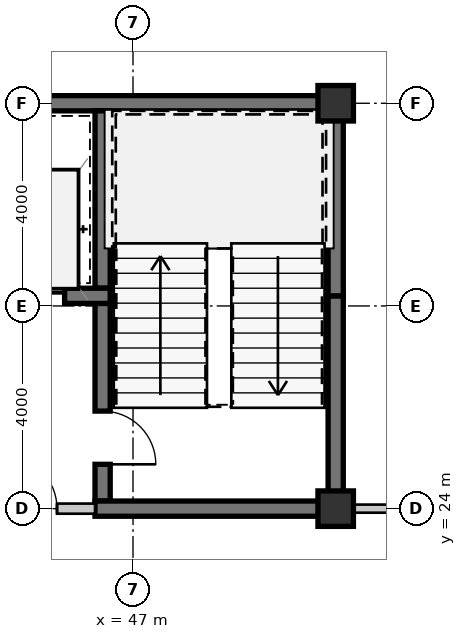
"""IFC4 building model, lengths in metres.
Left out: names, types, materials, properties, quantities, classifications, styles, units other than length and angle.
Written with IfcOpenShell. Run it as: python <this file> out.ifc"""

import sys

from ifc_helpers import new_model, si_unit, direction, frame, frame_2d, origin, origin_2d, place, context, subcontext, project, spatial, rectangle, extrude, source, transform, mapped, element, fill, save


model = new_model("IFC4")
c1 = context("Model", 3, precision=1e-05, world=origin(), true_north=direction((0.0, 1.0)))
c2 = subcontext(c1, "Body", "Model", "MODEL_VIEW")
j1 = project(units=[si_unit("LENGTHUNIT", "METRE"), si_unit("PLANEANGLEUNIT", "RADIAN")], contexts=[c1])
p1 = place(None, origin())
s1 = spatial("IfcSite", under=j1, at=p1, CompositionType="ELEMENT")
p2 = place(p1, origin())
s2 = spatial("IfcBuilding", under=s1, at=p2, CompositionType="ELEMENT")
p3 = place(p2, frame((0.0, 0.0, 106.05)))
s3 = spatial("IfcBuildingStorey", under=s2, at=p3, CompositionType="ELEMENT", Elevation=106.05)
m1 = source(origin(), c2, "Body", "SweptSolid", [
    extrude(rectangle(XDim=0.7, YDim=0.7, at=origin_2d()), origin(), (0.0, 0.0, 1.0), 3.15),
])
for number, where, z_axis, x_axis in (
    (1, (51.0, 24.0, 0.0), (0.0, 0.0, 1.0), (1.0, 0.0, 0.0)),
    (2, (51.0, 32.0, 0.0), (0.0, 0.0, 1.0), (1.0, 0.0, 0.0)),
):
    element("IfcColumn", number, at=place(p3, frame(where, z_axis=z_axis, x_axis=x_axis)), inside=s3, PredefinedType="COLUMN", context=c2, shape_type="MappedRepresentation", body=[
        mapped(m1, transform((0.0, 0.0, 0.0), scale=1.0)),
    ])
m2 = source(origin(), c2, "Body", "SweptSolid", [
    extrude(rectangle(XDim=11.95, YDim=0.3, at=frame_2d((5.975, 0.0))), origin(), (0.0, 0.0, 1.0), 2.93),
])
p4 = place(p3, frame((39.2, 32.0, 0.0), z_axis=(0.0, 0.0, 1.0), x_axis=(1.0, 0.0, 0.0)))
e3 = element("IfcWall", 3, at=p4, inside=s3, PredefinedType="SHEAR", context=c2, shape_type="MappedRepresentation", body=[
    mapped(m2, transform((0.0, 0.0, 0.0), scale=1.0)),
])
m3 = source(origin(), c2, "Body", "SweptSolid", [
    extrude(rectangle(XDim=4.05, YDim=0.3, at=frame_2d((2.025, 0.0))), origin(), (0.0, 0.0, 1.0), 2.93),
])
p5 = place(p3, frame((51.0, 24.15, 0.0), z_axis=(0.0, 0.0, 1.0), x_axis=(0.0, 1.0, 0.0)))
e4 = element("IfcWall", 4, at=p5, inside=s3, PredefinedType="SHEAR", context=c2, shape_type="MappedRepresentation", body=[
    mapped(m3, transform((0.0, 0.0, 0.0), scale=1.0)),
])
m4 = source(origin(), c2, "Body", "SweptSolid", [
    extrude(rectangle(XDim=3.65, YDim=0.3, at=frame_2d((1.825, 0.0))), origin(), (0.0, 0.0, 1.0), 2.93),
])
p6 = place(p3, frame((51.0, 28.2, 0.0), z_axis=(0.0, 0.0, 1.0), x_axis=(0.0, 1.0, 0.0)))
e5 = element("IfcWall", 5, at=p6, inside=s3, PredefinedType="SHEAR", context=c2, shape_type="MappedRepresentation", body=[
    mapped(m4, transform((0.0, 0.0, 0.0), scale=1.0)),
])
m5 = source(origin(), c2, "Body", "SweptSolid", [
    extrude(rectangle(XDim=3.5, YDim=0.3, at=frame_2d((1.75, 0.0))), origin(), (0.0, 0.0, 1.0), 2.93),
])
p7 = place(p3, frame((46.4, 31.85, 0.0), z_axis=(0.0, 0.0, 1.0), x_axis=(0.0, -1.0, 0.0)))
e6 = element("IfcWall", 6, at=p7, inside=s3, PredefinedType="SHEAR", context=c2, shape_type="MappedRepresentation", body=[
    mapped(m5, transform((0.0, 0.0, 0.0), scale=1.0)),
])
m6 = source(origin(), c2, "Body", "SweptSolid", [
    extrude(rectangle(XDim=3.9, YDim=0.3, at=frame_2d((1.95, 0.0))), origin(), (0.0, 0.0, 1.0), 2.93),
])
p8 = place(p3, frame((46.4, 28.05, 0.0), z_axis=(0.0, 0.0, 1.0), x_axis=(0.0, -1.0, 0.0)))
e7 = element("IfcWall", 7, at=p8, inside=s3, PredefinedType="SHEAR", context=c2, shape_type="MappedRepresentation", body=[
    mapped(m6, transform((0.0, 0.0, 0.0), scale=1.0)),
])
m7 = source(origin(), c2, "Body", "SweptSolid", [
    extrude(rectangle(XDim=1.05, YDim=2.1, at=frame_2d((0.525, 1.05))), frame((0.0, 0.16, 0.0), z_axis=(0.0, -1.0, 0.0), x_axis=(1.0, 0.0, 0.0)), (0.0, 0.0, 1.0), 0.32),
])
p9 = place(p8, frame((2.125, 0.0, 0.0)))
e8 = element("IfcOpeningElement", 8, at=p9, cuts=e7, PredefinedType="OPENING", context=c2, shape_type="MappedRepresentation", body=[
    mapped(m7, transform((0.0, 0.0, 0.0), scale=1.0)),
])
m8 = source(origin(), c2, "Body", "SweptSolid", [
    extrude(rectangle(XDim=4.9, YDim=0.3, at=frame_2d((2.45, 0.0))), origin(), (0.0, 0.0, 1.0), 2.93),
])
p10 = place(p3, frame((46.25, 24.0, 0.0), z_axis=(0.0, 0.0, 1.0), x_axis=(1.0, 0.0, 0.0)))
e9 = element("IfcWall", 9, at=p10, inside=s3, PredefinedType="SHEAR", context=c2, shape_type="MappedRepresentation", body=[
    mapped(m8, transform((0.0, 0.0, 0.0), scale=1.0)),
])
m9 = source(origin(), c2, "Body", "SweptSolid", [
    extrude(rectangle(XDim=2.9, YDim=0.3, at=frame_2d((1.45, 0.0))), origin(), (0.0, 0.0, 1.0), 2.93),
])
p11 = place(p3, frame((43.65, 28.2, 0.0), z_axis=(0.0, 0.0, 1.0), x_axis=(1.0, 0.0, 0.0)))
e10 = element("IfcWall", 10, at=p11, inside=s3, PredefinedType="SHEAR", context=c2, shape_type="MappedRepresentation", body=[
    mapped(m9, transform((0.0, 0.0, 0.0), scale=1.0)),
])
m10 = source(origin(), c2, "Body", "SweptSolid", [
    extrude(rectangle(XDim=1.1, YDim=2.15, at=frame_2d((0.55, 1.075))), frame((0.0, 0.16, 0.0), z_axis=(0.0, -1.0, 0.0), x_axis=(1.0, 0.0, 0.0)), (0.0, 0.0, 1.0), 0.32),
])
p12 = place(p11, frame((0.9, 0.0, 0.0)))
e11 = element("IfcOpeningElement", 11, at=p12, cuts=e10, PredefinedType="OPENING", context=c2, shape_type="MappedRepresentation", body=[
    mapped(m10, transform((0.0, 0.0, 0.0), scale=1.0)),
])
m11 = source(origin(), c2, "Body", "SweptSolid", [
    extrude(rectangle(XDim=2.7, YDim=0.2, at=frame_2d((1.35, 0.0))), origin(), (0.0, 0.0, 1.0), 2.397),
])
p13 = place(p3, frame((43.55, 24.0, 0.0), z_axis=(0.0, 0.0, 1.0), x_axis=(1.0, 0.0, 0.0)))
e12 = element("IfcWall", 12, at=p13, inside=s3, PredefinedType="SOLIDWALL", context=c2, shape_type="MappedRepresentation", body=[
    mapped(m11, transform((0.0, 0.0, 0.0), scale=1.0)),
])
m12 = source(origin(), c2, "Body", "SweptSolid", [
    extrude(rectangle(XDim=1.05, YDim=2.1, at=frame_2d((0.525, 1.05))), frame((0.0, 0.11, 0.0), z_axis=(0.0, -1.0, 0.0), x_axis=(1.0, 0.0, 0.0)), (0.0, 0.0, 1.0), 0.22),
])
p14 = place(p13, frame((0.9, 0.0, 0.0)))
e13 = element("IfcOpeningElement", 13, at=p14, cuts=e12, PredefinedType="OPENING", context=c2, shape_type="MappedRepresentation", body=[
    mapped(m12, transform((0.0, 0.0, 0.0), scale=1.0)),
])
m13 = source(origin(), c2, "Body", "SweptSolid", [
    extrude(rectangle(XDim=1.155, YDim=0.16, at=frame_2d((0.577, 0.0))), origin(), (0.0, 0.0, 1.0), 2.328),
])
p15 = place(p3, frame((51.15, 24.0, 0.0), z_axis=(0.0, 0.0, 1.0), x_axis=(1.0, 0.0, 0.0)))
e14 = element("IfcWall", 14, at=p15, inside=s3, PredefinedType="PARTITIONING", context=c2, shape_type="MappedRepresentation", body=[
    mapped(m13, transform((0.0, 0.0, 0.0), scale=1.0)),
])
m14 = source(origin(), c2, "Body", "SweptSolid", [
    extrude(rectangle(XDim=1.05, YDim=2.1, at=frame_2d((0.525, 1.05))), frame((0.0, 0.025, 0.0), z_axis=(0.0, -1.0, 0.0), x_axis=(1.0, 0.0, 0.0)), (0.0, 0.0, 1.0), 0.05),
])
p16 = place(p9, origin())
e15 = element("IfcDoor", 15, at=p16, inside=s3, OperationType="SINGLE_SWING_RIGHT", PredefinedType="DOOR", context=c2, shape_type="MappedRepresentation", body=[
    mapped(m14, transform((0.0, 0.0, 0.0), scale=1.0)),
])
fill(e8, e15)
m15 = source(origin(), c2, "Body", "SweptSolid", [
    extrude(rectangle(XDim=1.1, YDim=2.15, at=frame_2d((0.55, 1.075))), frame((0.0, 0.025, 0.0), z_axis=(0.0, -1.0, 0.0), x_axis=(1.0, 0.0, 0.0)), (0.0, 0.0, 1.0), 0.05),
])
p17 = place(p12, origin())
e16 = element("IfcDoor", 16, at=p17, inside=s3, OperationType="SLIDING_TO_LEFT", PredefinedType="DOOR", context=c2, shape_type="MappedRepresentation", body=[
    mapped(m15, transform((0.0, 0.0, 0.0), scale=1.0)),
])
fill(e11, e16)
p18 = place(p14, origin())
e17 = element("IfcDoor", 17, at=p18, inside=s3, OperationType="SINGLE_SWING_LEFT", PredefinedType="DOOR", context=c2, shape_type="MappedRepresentation", body=[
    mapped(m14, transform((0.0, 0.0, 0.0), scale=1.0)),
])
fill(e13, e17)
save(model, sys.argv[1])
